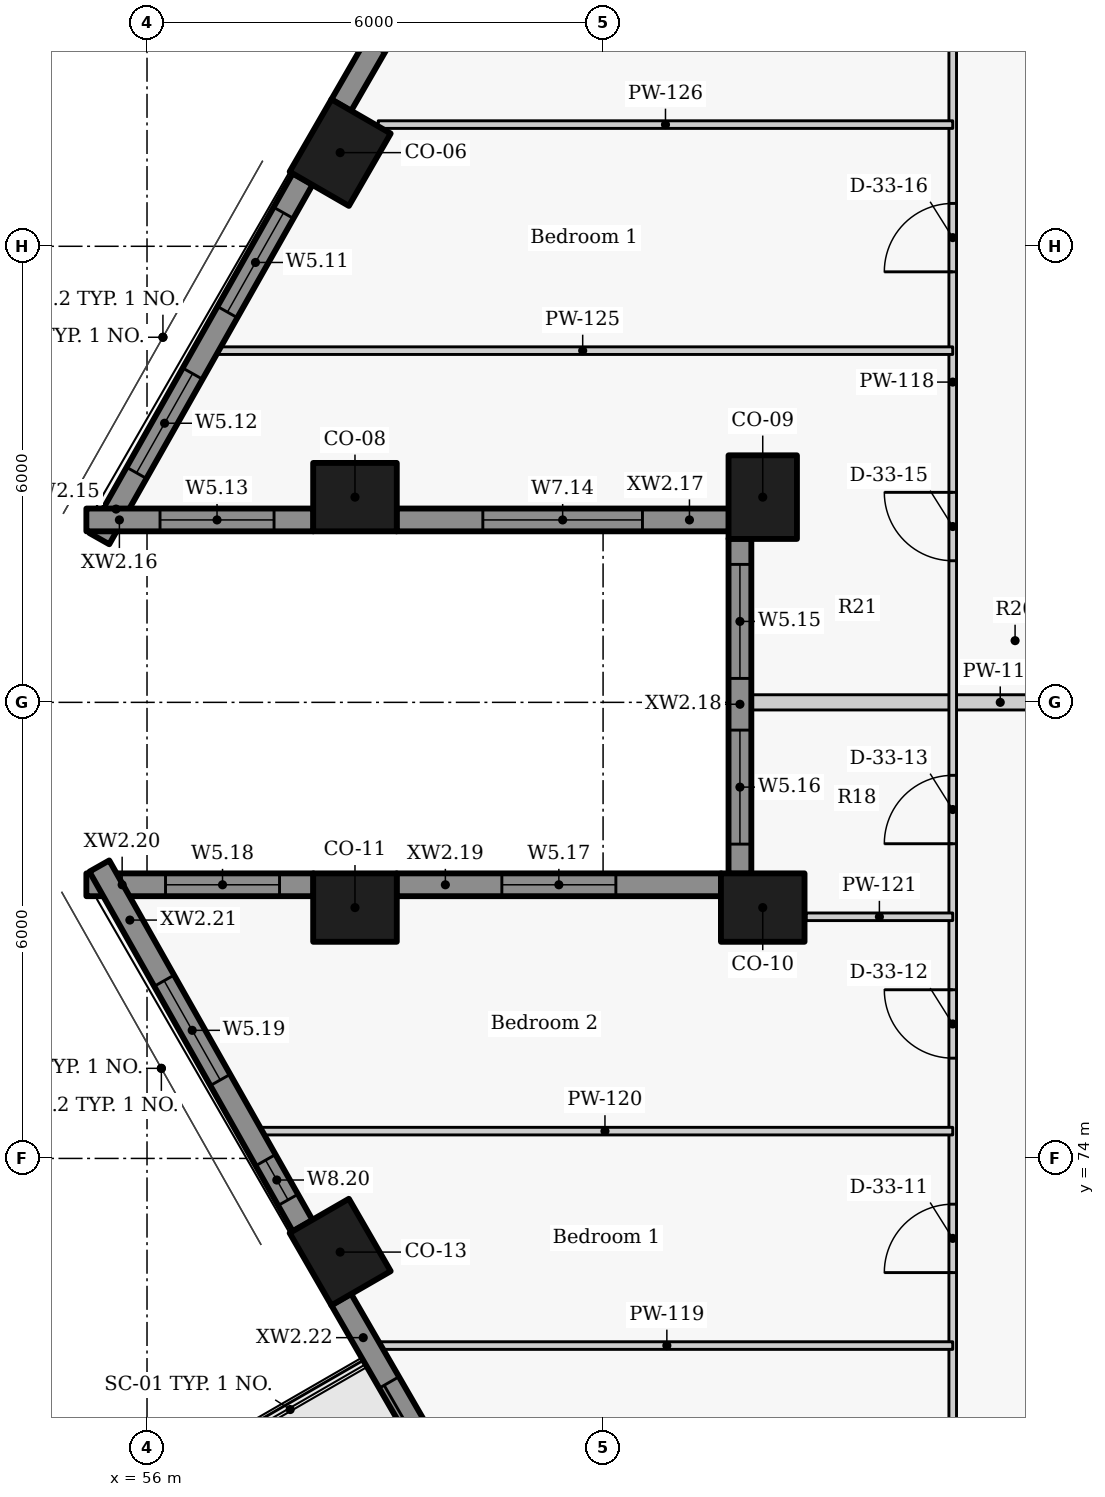
"""IFC4 building model, lengths in metres.
Left out: names, types, materials, properties, quantities, classifications, styles, units other than length and angle.
Written with IfcOpenShell. Run it as: python <this file> out.ifc"""

import sys

from ifc_helpers import new_model, si_unit, direction, frame, frame_2d, origin, origin_2d, place, context, subcontext, project, spatial, rectangle, extrude, element, fill, save


model = new_model("IFC4")
c1 = context("Model", 3, precision=1e-05, world=origin(), true_north=direction((0.0, 1.0)))
c2 = subcontext(c1, "Body", "Model", "MODEL_VIEW")
j1 = project(units=[si_unit("LENGTHUNIT", "METRE"), si_unit("PLANEANGLEUNIT", "RADIAN")], contexts=[c1])
p1 = place(None, origin())
s1 = spatial("IfcSite", under=j1, at=p1, CompositionType="ELEMENT")
p2 = place(p1, origin())
s2 = spatial("IfcBuilding", under=s1, at=p2, CompositionType="ELEMENT")
p3 = place(p2, frame((0.0, 0.0, 226.2)))
s3 = spatial("IfcBuildingStorey", under=s2, at=p3, CompositionType="ELEMENT", Elevation=226.2)
for number, where, z_axis, x_axis in (
    (1, (58.541, 87.232, 0.0), (0.0, 0.0, 1.0), (-0.5, -0.866, 0.0)),
    (2, (58.736, 82.7, 0.0), (0.0, 0.0, 1.0), (1.0, 0.0, 0.0)),
    (3, (64.101, 82.7, 0.0), (0.0, 0.0, 1.0), (0.0, -1.0, 0.0)),
    (4, (64.101, 77.3, 0.0), (0.0, 0.0, 1.0), (-1.0, 0.0, 0.0)),
    (5, (58.736, 77.3, 0.0), (0.0, 0.0, 1.0), (-1.0, 0.0, 0.0)),
    (6, (58.541, 72.768, 0.0), (0.0, 0.0, 1.0), (0.5, -0.866, 0.0)),
):
    element("IfcColumn", number, at=place(p3, frame(where, z_axis=z_axis, x_axis=x_axis)), inside=s3, PredefinedType="COLUMN", context=c2, shape_type="SweptSolid", body=[
        extrude(rectangle(XDim=1.1, YDim=0.9, at=origin_2d()), origin(), (0.0, 0.0, 1.0), 3.3),
    ])
p4 = place(p3, frame((60.328, 90.927, 0.0), z_axis=(0.0, 0.0, 1.0), x_axis=(-0.500010404316, -0.866019396766, 0.0)))
e7 = element("IfcWall", 7, at=p4, inside=s3, PredefinedType="SOLIDWALL", context=c2, shape_type="SweptSolid", body=[
    extrude(rectangle(XDim=3.547, YDim=0.3, at=frame_2d((1.774, 0.0))), origin(), (0.0, 0.0, 1.0), 2.425),
])
p5 = place(p4, frame((1.165, 0.0, 0.9)))
e8 = element("IfcOpeningElement", 8, at=p5, cuts=e7, PredefinedType="OPENING", context=c2, shape_type="SweptSolid", body=[
    extrude(rectangle(XDim=1.5, YDim=1.1, at=frame_2d((0.75, 0.55))), frame((0.0, 0.16, 0.0), z_axis=(0.0, -1.0, 0.0), x_axis=(1.0, 0.0, 0.0)), (0.0, 0.0, 1.0), 0.32),
])
p6 = place(p3, frame((58.048, 86.886, 0.0), z_axis=(0.0, 0.0, 1.0), x_axis=(-0.492080931903, -0.870549456641, 0.0)))
e9 = element("IfcWall", 9, at=p6, inside=s3, PredefinedType="SOLIDWALL", context=c2, shape_type="SweptSolid", body=[
    extrude(rectangle(XDim=5.437, YDim=0.3, at=frame_2d((2.718, 0.0))), origin(), (0.0, 0.0, 1.0), 2.425),
])
p7 = place(p6, frame((0.512, 0.0, 0.9)))
e10 = element("IfcOpeningElement", 10, at=p7, cuts=e9, PredefinedType="OPENING", context=c2, shape_type="SweptSolid", body=[
    extrude(rectangle(XDim=1.5, YDim=1.1, at=frame_2d((0.75, 0.55))), frame((0.0, 0.16, 0.0), z_axis=(0.0, -1.0, 0.0), x_axis=(1.0, 0.0, 0.0)), (0.0, 0.0, 1.0), 0.32),
])
p8 = place(p6, frame((2.942, 0.0, 0.9)))
e11 = element("IfcOpeningElement", 11, at=p8, cuts=e9, PredefinedType="OPENING", context=c2, shape_type="SweptSolid", body=[
    extrude(rectangle(XDim=1.5, YDim=1.1, at=frame_2d((0.75, 0.55))), frame((0.0, 0.16, 0.0), z_axis=(0.0, -1.0, 0.0), x_axis=(1.0, 0.0, 0.0)), (0.0, 0.0, 1.0), 0.32),
])
p9 = place(p3, frame((55.202, 82.4, 0.0), z_axis=(0.0, 0.0, 1.0), x_axis=(1.0, 0.0, 0.0)))
e12 = element("IfcWall", 12, at=p9, inside=s3, PredefinedType="SOLIDWALL", context=c2, shape_type="SweptSolid", body=[
    extrude(rectangle(XDim=2.988, YDim=0.3, at=frame_2d((1.494, 0.0))), origin(), (0.0, 0.0, 1.0), 2.425),
])
p10 = place(p9, frame((0.969, 0.0, 0.9)))
e13 = element("IfcOpeningElement", 13, at=p10, cuts=e12, PredefinedType="OPENING", context=c2, shape_type="SweptSolid", body=[
    extrude(rectangle(XDim=1.5, YDim=1.1, at=frame_2d((0.75, 0.55))), frame((0.0, 0.16, 0.0), z_axis=(0.0, -1.0, 0.0), x_axis=(1.0, 0.0, 0.0)), (0.0, 0.0, 1.0), 0.32),
])
p11 = place(p3, frame((59.282, 82.4, 0.0), z_axis=(0.0, 0.0, 1.0), x_axis=(1.0, 0.0, 0.0)))
e14 = element("IfcWall", 14, at=p11, inside=s3, PredefinedType="SOLIDWALL", context=c2, shape_type="SweptSolid", body=[
    extrude(rectangle(XDim=4.373, YDim=0.3, at=frame_2d((2.186, 0.0))), origin(), (0.0, 0.0, 1.0), 2.425),
])
p12 = place(p11, frame((1.136, 0.0, 0.9)))
e15 = element("IfcOpeningElement", 15, at=p12, cuts=e14, PredefinedType="OPENING", context=c2, shape_type="SweptSolid", body=[
    extrude(rectangle(XDim=2.1, YDim=1.1, at=frame_2d((1.05, 0.55))), frame((0.0, 0.16, 0.0), z_axis=(0.0, -1.0, 0.0), x_axis=(1.0, 0.0, 0.0)), (0.0, 0.0, 1.0), 0.32),
])
p13 = place(p3, frame((63.801, 82.154, 0.0), z_axis=(0.0, 0.0, 1.0), x_axis=(0.0, -1.0, 0.0)))
e16 = element("IfcWall", 16, at=p13, inside=s3, PredefinedType="SOLIDWALL", context=c2, shape_type="SweptSolid", body=[
    extrude(rectangle(XDim=4.408, YDim=0.3, at=frame_2d((2.204, 0.0))), origin(), (0.0, 0.0, 1.0), 2.425),
])
p14 = place(p13, frame((0.339, 0.0, 0.9)))
e17 = element("IfcOpeningElement", 17, at=p14, cuts=e16, PredefinedType="OPENING", context=c2, shape_type="SweptSolid", body=[
    extrude(rectangle(XDim=1.5, YDim=1.1, at=frame_2d((0.75, 0.55))), frame((0.0, 0.16, 0.0), z_axis=(0.0, -1.0, 0.0), x_axis=(1.0, 0.0, 0.0)), (0.0, 0.0, 1.0), 0.32),
])
p15 = place(p13, frame((2.519, 0.0, 0.9)))
e18 = element("IfcOpeningElement", 18, at=p15, cuts=e16, PredefinedType="OPENING", context=c2, shape_type="SweptSolid", body=[
    extrude(rectangle(XDim=1.5, YDim=1.1, at=frame_2d((0.75, 0.55))), frame((0.0, 0.16, 0.0), z_axis=(0.0, -1.0, 0.0), x_axis=(1.0, 0.0, 0.0)), (0.0, 0.0, 1.0), 0.32),
])
p16 = place(p3, frame((63.554, 77.6, 0.0), z_axis=(0.0, 0.0, 1.0), x_axis=(-1.0, 0.0, 0.0)))
e19 = element("IfcWall", 19, at=p16, inside=s3, PredefinedType="SOLIDWALL", context=c2, shape_type="SweptSolid", body=[
    extrude(rectangle(XDim=4.272, YDim=0.3, at=frame_2d((2.136, 0.0))), origin(), (0.0, 0.0, 1.0), 2.425),
])
p17 = place(p16, frame((1.386, 0.0, 0.9)))
e20 = element("IfcOpeningElement", 20, at=p17, cuts=e19, PredefinedType="OPENING", context=c2, shape_type="SweptSolid", body=[
    extrude(rectangle(XDim=1.5, YDim=1.1, at=frame_2d((0.75, 0.55))), frame((0.0, 0.16, 0.0), z_axis=(0.0, -1.0, 0.0), x_axis=(1.0, 0.0, 0.0)), (0.0, 0.0, 1.0), 0.32),
])
p18 = place(p3, frame((58.19, 77.6, 0.0), z_axis=(0.0, 0.0, 1.0), x_axis=(-1.0, 0.0, 0.0)))
e21 = element("IfcWall", 21, at=p18, inside=s3, PredefinedType="SOLIDWALL", context=c2, shape_type="SweptSolid", body=[
    extrude(rectangle(XDim=2.988, YDim=0.3, at=frame_2d((1.494, 0.0))), origin(), (0.0, 0.0, 1.0), 2.425),
])
p19 = place(p18, frame((0.447, 0.0, 0.9)))
e22 = element("IfcOpeningElement", 22, at=p19, cuts=e21, PredefinedType="OPENING", context=c2, shape_type="SweptSolid", body=[
    extrude(rectangle(XDim=1.5, YDim=1.1, at=frame_2d((0.75, 0.55))), frame((0.0, 0.16, 0.0), z_axis=(0.0, -1.0, 0.0), x_axis=(1.0, 0.0, 0.0)), (0.0, 0.0, 1.0), 0.32),
])
p20 = place(p3, frame((55.373, 77.846, 0.0), z_axis=(0.0, 0.0, 1.0), x_axis=(0.492080931903, -0.870549456641, 0.0)))
e23 = element("IfcWall", 23, at=p20, inside=s3, PredefinedType="SOLIDWALL", context=c2, shape_type="SweptSolid", body=[
    extrude(rectangle(XDim=5.437, YDim=0.3, at=frame_2d((2.718, 0.0))), origin(), (0.0, 0.0, 1.0), 2.425),
])
p21 = place(p20, frame((1.733, 0.0, 0.9)))
e24 = element("IfcOpeningElement", 24, at=p21, cuts=e23, PredefinedType="OPENING", context=c2, shape_type="SweptSolid", body=[
    extrude(rectangle(XDim=1.5, YDim=1.1, at=frame_2d((0.75, 0.55))), frame((0.0, 0.16, 0.0), z_axis=(0.0, -1.0, 0.0), x_axis=(1.0, 0.0, 0.0)), (0.0, 0.0, 1.0), 0.32),
])
p22 = place(p20, frame((4.445, 0.0, 0.9)))
e25 = element("IfcOpeningElement", 25, at=p22, cuts=e23, PredefinedType="OPENING", context=c2, shape_type="SweptSolid", body=[
    extrude(rectangle(XDim=0.6, YDim=1.1, at=frame_2d((0.3, 0.55))), frame((0.0, 0.16, 0.0), z_axis=(0.0, -1.0, 0.0), x_axis=(1.0, 0.0, 0.0)), (0.0, 0.0, 1.0), 0.32),
])
p23 = place(p3, frame((58.554, 72.145, 0.0), z_axis=(0.0, 0.0, 1.0), x_axis=(0.500010404316, -0.866019396766, 0.0)))
e26 = element("IfcWall", 26, at=p23, inside=s3, PredefinedType="SOLIDWALL", context=c2, shape_type="SweptSolid", body=[
    extrude(rectangle(XDim=3.547, YDim=0.3, at=frame_2d((1.774, 0.0))), origin(), (0.0, 0.0, 1.0), 2.425),
])
p24 = place(p23, frame((1.261, 0.0, 0.0)))
e27 = element("IfcOpeningElement", 27, at=p24, cuts=e26, PredefinedType="OPENING", context=c2, shape_type="SweptSolid", body=[
    extrude(rectangle(XDim=1.8, YDim=2.0, at=frame_2d((0.9, 1.0))), frame((0.0, 0.16, 0.0), z_axis=(0.0, -1.0, 0.0), x_axis=(1.0, 0.0, 0.0)), (0.0, 0.0, 1.0), 0.32),
])
p25 = place(p3, frame((63.95, 80.0, 0.0), z_axis=(0.0, 0.0, 1.0), x_axis=(1.0, 0.0, 0.0)))
e28 = element("IfcWall", 28, at=p25, inside=s3, PredefinedType="PARTITIONING", context=c2, shape_type="SweptSolid", body=[
    extrude(rectangle(XDim=6.55, YDim=0.2, at=frame_2d((3.275, 0.0))), origin(), (0.0, 0.0, 1.0), 2.405),
])
p26 = place(p3, frame((66.6, 67.15, 0.0), z_axis=(0.0, 0.0, 1.0), x_axis=(0.0, 1.0, 0.0)))
e29 = element("IfcWall", 29, at=p26, inside=s3, PredefinedType="PARTITIONING", context=c2, shape_type="SweptSolid", body=[
    extrude(rectangle(XDim=26.4, YDim=0.1, at=frame_2d((13.2, 0.0))), origin(), (0.0, 0.0, 1.0), 3.025),
])
p27 = place(p26, frame((1.744, 0.0, 0.0)))
e30 = element("IfcOpeningElement", 30, at=p27, cuts=e29, PredefinedType="OPENING", context=c2, shape_type="SweptSolid", body=[
    extrude(rectangle(XDim=0.9, YDim=2.1, at=frame_2d((0.45, 1.05))), frame((0.0, 0.06, 0.0), z_axis=(0.0, -1.0, 0.0), x_axis=(1.0, 0.0, 0.0)), (0.0, 0.0, 1.0), 0.12),
])
p28 = place(p26, frame((5.348, 0.0, 0.0)))
e31 = element("IfcOpeningElement", 31, at=p28, cuts=e29, PredefinedType="OPENING", context=c2, shape_type="SweptSolid", body=[
    extrude(rectangle(XDim=0.9, YDim=2.1, at=frame_2d((0.45, 1.05))), frame((0.0, 0.06, 0.0), z_axis=(0.0, -1.0, 0.0), x_axis=(1.0, 0.0, 0.0)), (0.0, 0.0, 1.0), 0.12),
])
p29 = place(p26, frame((8.169, 0.0, 0.0)))
e32 = element("IfcOpeningElement", 32, at=p29, cuts=e29, PredefinedType="OPENING", context=c2, shape_type="SweptSolid", body=[
    extrude(rectangle(XDim=0.9, YDim=2.1, at=frame_2d((0.45, 1.05))), frame((0.0, 0.06, 0.0), z_axis=(0.0, -1.0, 0.0), x_axis=(1.0, 0.0, 0.0)), (0.0, 0.0, 1.0), 0.12),
])
p30 = place(p26, frame((10.99, 0.0, 0.0)))
e33 = element("IfcOpeningElement", 33, at=p30, cuts=e29, PredefinedType="OPENING", context=c2, shape_type="SweptSolid", body=[
    extrude(rectangle(XDim=0.9, YDim=2.1, at=frame_2d((0.45, 1.05))), frame((0.0, 0.06, 0.0), z_axis=(0.0, -1.0, 0.0), x_axis=(1.0, 0.0, 0.0)), (0.0, 0.0, 1.0), 0.12),
])
p31 = place(p26, frame((14.713, 0.0, 0.0)))
e34 = element("IfcOpeningElement", 34, at=p31, cuts=e29, PredefinedType="OPENING", context=c2, shape_type="SweptSolid", body=[
    extrude(rectangle(XDim=0.9, YDim=2.1, at=frame_2d((0.45, 1.05))), frame((0.0, 0.06, 0.0), z_axis=(0.0, -1.0, 0.0), x_axis=(1.0, 0.0, 0.0)), (0.0, 0.0, 1.0), 0.12),
])
p32 = place(p26, frame((18.514, 0.0, 0.0)))
e35 = element("IfcOpeningElement", 35, at=p32, cuts=e29, PredefinedType="OPENING", context=c2, shape_type="SweptSolid", body=[
    extrude(rectangle(XDim=0.9, YDim=2.1, at=frame_2d((0.45, 1.05))), frame((0.0, 0.06, 0.0), z_axis=(0.0, -1.0, 0.0), x_axis=(1.0, 0.0, 0.0)), (0.0, 0.0, 1.0), 0.12),
])
p33 = place(p26, frame((21.488, 0.0, 0.0)))
e36 = element("IfcOpeningElement", 36, at=p33, cuts=e29, PredefinedType="OPENING", context=c2, shape_type="SweptSolid", body=[
    extrude(rectangle(XDim=0.9, YDim=2.1, at=frame_2d((0.45, 1.05))), frame((0.0, 0.06, 0.0), z_axis=(0.0, -1.0, 0.0), x_axis=(1.0, 0.0, 0.0)), (0.0, 0.0, 1.0), 0.12),
])
p34 = place(p26, frame((24.463, 0.0, 0.0)))
e37 = element("IfcOpeningElement", 37, at=p34, cuts=e29, PredefinedType="OPENING", context=c2, shape_type="SweptSolid", body=[
    extrude(rectangle(XDim=0.9, YDim=2.1, at=frame_2d((0.45, 1.05))), frame((0.0, 0.06, 0.0), z_axis=(0.0, -1.0, 0.0), x_axis=(1.0, 0.0, 0.0)), (0.0, 0.0, 1.0), 0.12),
])
p35 = place(p3, frame((59.078, 71.538, 0.0), z_axis=(0.0, 0.0, 1.0), x_axis=(1.0, 0.0, 0.0)))
e38 = element("IfcWall", 38, at=p35, inside=s3, PredefinedType="PARTITIONING", context=c2, shape_type="SweptSolid", body=[
    extrude(rectangle(XDim=7.522, YDim=0.1, at=frame_2d((3.761, 0.0))), origin(), (0.0, 0.0, 1.0), 2.405),
])
p36 = place(p3, frame((57.449, 74.359, 0.0), z_axis=(0.0, 0.0, 1.0), x_axis=(1.0, 0.0, 0.0)))
e39 = element("IfcWall", 39, at=p36, inside=s3, PredefinedType="PARTITIONING", context=c2, shape_type="SweptSolid", body=[
    extrude(rectangle(XDim=9.151, YDim=0.1, at=frame_2d((4.575, 0.0))), origin(), (0.0, 0.0, 1.0), 2.405),
])
p37 = place(p3, frame((64.67, 77.179, 0.0), z_axis=(0.0, 0.0, 1.0), x_axis=(1.0, 0.0, 0.0)))
e40 = element("IfcWall", 40, at=p37, inside=s3, PredefinedType="PARTITIONING", context=c2, shape_type="SweptSolid", body=[
    extrude(rectangle(XDim=1.93, YDim=0.1, at=frame_2d((0.965, 0.0))), origin(), (0.0, 0.0, 1.0), 3.025),
])
p38 = place(p3, frame((56.864, 84.627, 0.0), z_axis=(0.0, 0.0, 1.0), x_axis=(1.0, 0.0, 0.0)))
e41 = element("IfcWall", 41, at=p38, inside=s3, PredefinedType="PARTITIONING", context=c2, shape_type="SweptSolid", body=[
    extrude(rectangle(XDim=9.736, YDim=0.1, at=frame_2d((4.868, 0.0))), origin(), (0.0, 0.0, 1.0), 2.405),
])
p39 = place(p3, frame((59.042, 87.601, 0.0), z_axis=(0.0, 0.0, 1.0), x_axis=(1.0, 0.0, 0.0)))
e42 = element("IfcWall", 42, at=p39, inside=s3, PredefinedType="PARTITIONING", context=c2, shape_type="SweptSolid", body=[
    extrude(rectangle(XDim=7.558, YDim=0.1, at=frame_2d((3.779, 0.0))), origin(), (0.0, 0.0, 1.0), 3.025),
])
p40 = place(p7, origin())
e43 = element("IfcWindow", 43, at=p40, inside=s3, PartitioningType="SINGLE_PANEL", PredefinedType="WINDOW", context=c2, shape_type="SweptSolid", body=[
    extrude(rectangle(XDim=1.5, YDim=1.1, at=frame_2d((0.75, 0.55))), frame((0.0, 0.03, 0.0), z_axis=(0.0, -1.0, 0.0), x_axis=(1.0, 0.0, 0.0)), (0.0, 0.0, 1.0), 0.06),
])
fill(e10, e43)
p41 = place(p8, origin())
e44 = element("IfcWindow", 44, at=p41, inside=s3, PartitioningType="SINGLE_PANEL", PredefinedType="WINDOW", context=c2, shape_type="SweptSolid", body=[
    extrude(rectangle(XDim=1.5, YDim=1.1, at=frame_2d((0.75, 0.55))), frame((0.0, 0.03, 0.0), z_axis=(0.0, -1.0, 0.0), x_axis=(1.0, 0.0, 0.0)), (0.0, 0.0, 1.0), 0.06),
])
fill(e11, e44)
p42 = place(p10, origin())
e45 = element("IfcWindow", 45, at=p42, inside=s3, PartitioningType="SINGLE_PANEL", PredefinedType="WINDOW", context=c2, shape_type="SweptSolid", body=[
    extrude(rectangle(XDim=1.5, YDim=1.1, at=frame_2d((0.75, 0.55))), frame((0.0, 0.03, 0.0), z_axis=(0.0, -1.0, 0.0), x_axis=(1.0, 0.0, 0.0)), (0.0, 0.0, 1.0), 0.06),
])
fill(e13, e45)
p43 = place(p12, origin())
e46 = element("IfcWindow", 46, at=p43, inside=s3, PartitioningType="SINGLE_PANEL", PredefinedType="WINDOW", context=c2, shape_type="SweptSolid", body=[
    extrude(rectangle(XDim=2.1, YDim=1.1, at=frame_2d((1.05, 0.55))), frame((0.0, 0.03, 0.0), z_axis=(0.0, -1.0, 0.0), x_axis=(1.0, 0.0, 0.0)), (0.0, 0.0, 1.0), 0.06),
])
fill(e15, e46)
p44 = place(p14, origin())
e47 = element("IfcWindow", 47, at=p44, inside=s3, PartitioningType="SINGLE_PANEL", PredefinedType="WINDOW", context=c2, shape_type="SweptSolid", body=[
    extrude(rectangle(XDim=1.5, YDim=1.1, at=frame_2d((0.75, 0.55))), frame((0.0, 0.03, 0.0), z_axis=(0.0, -1.0, 0.0), x_axis=(1.0, 0.0, 0.0)), (0.0, 0.0, 1.0), 0.06),
])
fill(e17, e47)
p45 = place(p15, origin())
e48 = element("IfcWindow", 48, at=p45, inside=s3, PartitioningType="SINGLE_PANEL", PredefinedType="WINDOW", context=c2, shape_type="SweptSolid", body=[
    extrude(rectangle(XDim=1.5, YDim=1.1, at=frame_2d((0.75, 0.55))), frame((0.0, 0.03, 0.0), z_axis=(0.0, -1.0, 0.0), x_axis=(1.0, 0.0, 0.0)), (0.0, 0.0, 1.0), 0.06),
])
fill(e18, e48)
p46 = place(p17, origin())
e49 = element("IfcWindow", 49, at=p46, inside=s3, PartitioningType="SINGLE_PANEL", PredefinedType="WINDOW", context=c2, shape_type="SweptSolid", body=[
    extrude(rectangle(XDim=1.5, YDim=1.1, at=frame_2d((0.75, 0.55))), frame((0.0, 0.03, 0.0), z_axis=(0.0, -1.0, 0.0), x_axis=(1.0, 0.0, 0.0)), (0.0, 0.0, 1.0), 0.06),
])
fill(e20, e49)
p47 = place(p19, origin())
e50 = element("IfcWindow", 50, at=p47, inside=s3, PartitioningType="SINGLE_PANEL", PredefinedType="WINDOW", context=c2, shape_type="SweptSolid", body=[
    extrude(rectangle(XDim=1.5, YDim=1.1, at=frame_2d((0.75, 0.55))), frame((0.0, 0.03, 0.0), z_axis=(0.0, -1.0, 0.0), x_axis=(1.0, 0.0, 0.0)), (0.0, 0.0, 1.0), 0.06),
])
fill(e22, e50)
p48 = place(p21, origin())
e51 = element("IfcWindow", 51, at=p48, inside=s3, PartitioningType="SINGLE_PANEL", PredefinedType="WINDOW", context=c2, shape_type="SweptSolid", body=[
    extrude(rectangle(XDim=1.5, YDim=1.1, at=frame_2d((0.75, 0.55))), frame((0.0, 0.03, 0.0), z_axis=(0.0, -1.0, 0.0), x_axis=(1.0, 0.0, 0.0)), (0.0, 0.0, 1.0), 0.06),
])
fill(e24, e51)
p49 = place(p22, origin())
e52 = element("IfcWindow", 52, at=p49, inside=s3, PartitioningType="SINGLE_PANEL", PredefinedType="WINDOW", context=c2, shape_type="SweptSolid", body=[
    extrude(rectangle(XDim=0.6, YDim=1.1, at=frame_2d((0.3, 0.55))), frame((0.0, 0.03, 0.0), z_axis=(0.0, -1.0, 0.0), x_axis=(1.0, 0.0, 0.0)), (0.0, 0.0, 1.0), 0.06),
])
fill(e25, e52)
p50 = place(p24, origin())
e53 = element("IfcDoor", 53, at=p50, inside=s3, OperationType="SLIDING_TO_LEFT", PredefinedType="DOOR", context=c2, shape_type="SweptSolid", body=[
    extrude(rectangle(XDim=1.8, YDim=2.0, at=frame_2d((0.9, 1.0))), frame((0.0, 0.025, 0.0), z_axis=(0.0, -1.0, 0.0), x_axis=(1.0, 0.0, 0.0)), (0.0, 0.0, 1.0), 0.05),
])
fill(e27, e53)
p51 = place(p28, origin())
e54 = element("IfcDoor", 54, at=p51, inside=s3, OperationType="SINGLE_SWING_LEFT", PredefinedType="DOOR", context=c2, shape_type="SweptSolid", body=[
    extrude(rectangle(XDim=0.9, YDim=2.1, at=frame_2d((0.45, 1.05))), frame((0.0, 0.025, 0.0), z_axis=(0.0, -1.0, 0.0), x_axis=(1.0, 0.0, 0.0)), (0.0, 0.0, 1.0), 0.05),
])
fill(e31, e54)
p52 = place(p29, origin())
e55 = element("IfcDoor", 55, at=p52, inside=s3, OperationType="SINGLE_SWING_RIGHT", PredefinedType="DOOR", context=c2, shape_type="SweptSolid", body=[
    extrude(rectangle(XDim=0.9, YDim=2.1, at=frame_2d((0.45, 1.05))), frame((0.0, 0.025, 0.0), z_axis=(0.0, -1.0, 0.0), x_axis=(1.0, 0.0, 0.0)), (0.0, 0.0, 1.0), 0.05),
])
fill(e32, e55)
p53 = place(p30, origin())
e56 = element("IfcDoor", 56, at=p53, inside=s3, OperationType="SINGLE_SWING_LEFT", PredefinedType="DOOR", context=c2, shape_type="SweptSolid", body=[
    extrude(rectangle(XDim=0.9, YDim=2.1, at=frame_2d((0.45, 1.05))), frame((0.0, 0.025, 0.0), z_axis=(0.0, -1.0, 0.0), x_axis=(1.0, 0.0, 0.0)), (0.0, 0.0, 1.0), 0.05),
])
fill(e33, e56)
p54 = place(p31, origin())
e57 = element("IfcDoor", 57, at=p54, inside=s3, OperationType="SINGLE_SWING_RIGHT", PredefinedType="DOOR", context=c2, shape_type="SweptSolid", body=[
    extrude(rectangle(XDim=0.9, YDim=2.1, at=frame_2d((0.45, 1.05))), frame((0.0, 0.025, 0.0), z_axis=(0.0, -1.0, 0.0), x_axis=(1.0, 0.0, 0.0)), (0.0, 0.0, 1.0), 0.05),
])
fill(e34, e57)
p55 = place(p32, origin())
e58 = element("IfcDoor", 58, at=p55, inside=s3, OperationType="SINGLE_SWING_LEFT", PredefinedType="DOOR", context=c2, shape_type="SweptSolid", body=[
    extrude(rectangle(XDim=0.9, YDim=2.1, at=frame_2d((0.45, 1.05))), frame((0.0, 0.025, 0.0), z_axis=(0.0, -1.0, 0.0), x_axis=(1.0, 0.0, 0.0)), (0.0, 0.0, 1.0), 0.05),
])
fill(e35, e58)
save(model, sys.argv[1])
